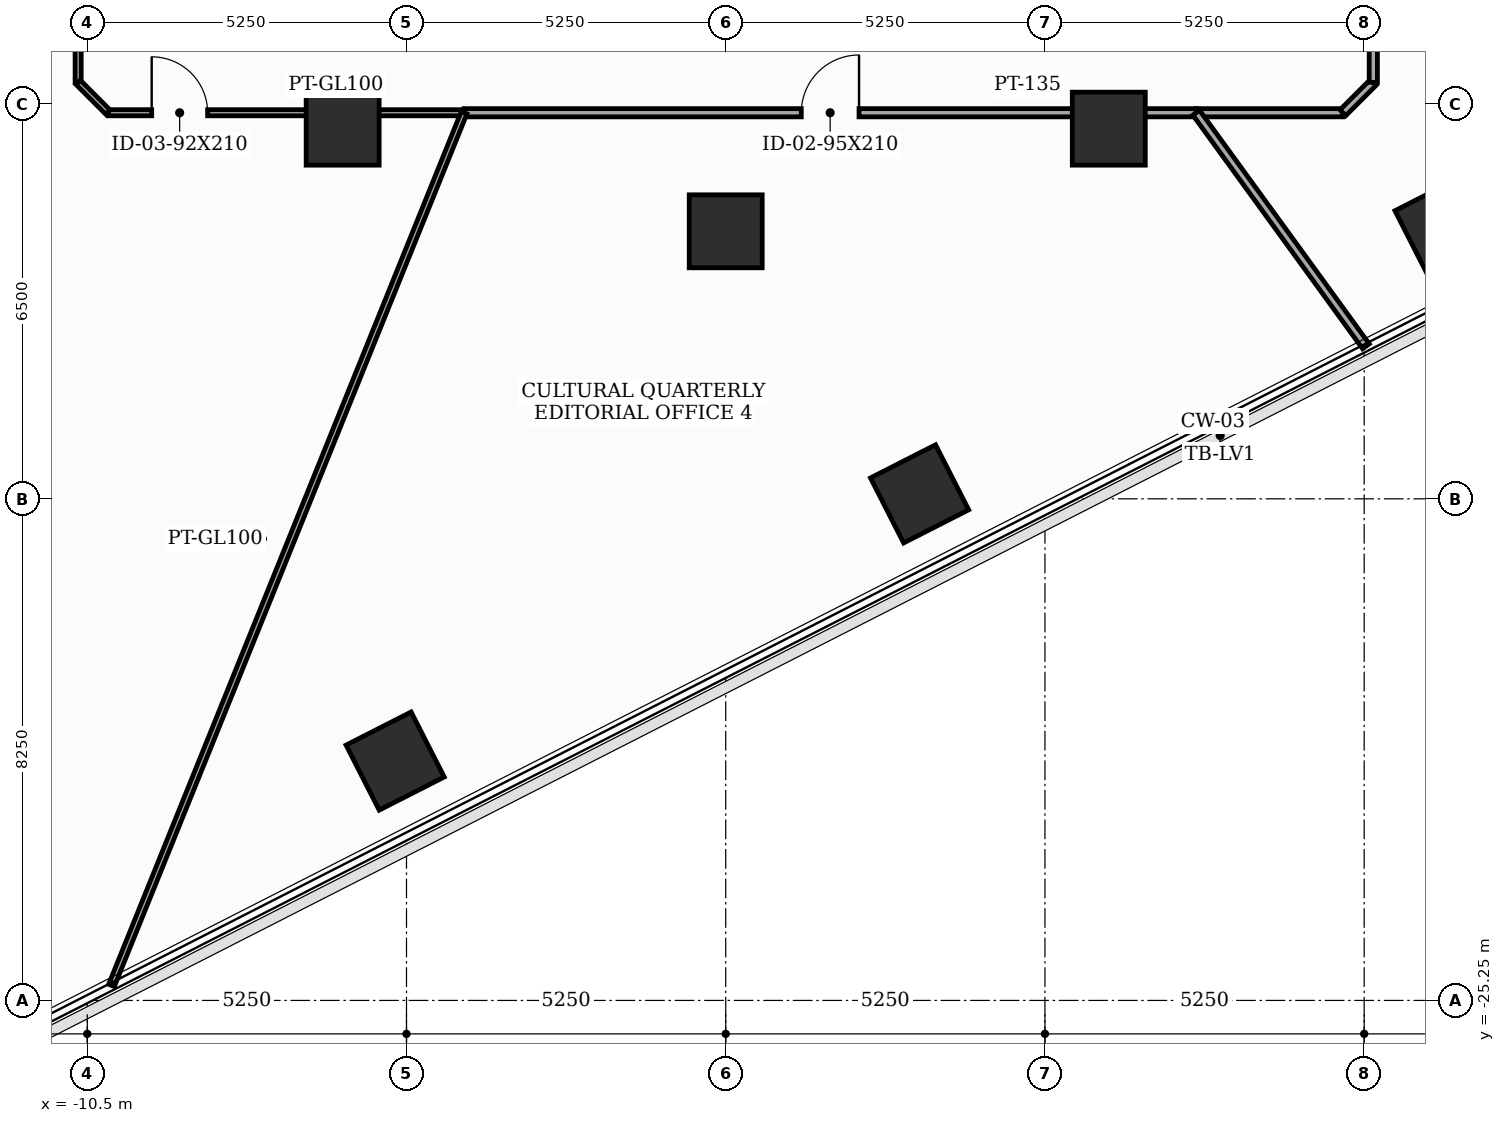
"""IFC4 building model, lengths in metres.
Left out: names, types, materials, properties, quantities, classifications, styles, units other than length and angle.
Written with IfcOpenShell. Run it as: python <this file> out.ifc"""

import sys

from ifc_helpers import new_model, si_unit, direction, frame, frame_2d, origin, origin_2d, place, context, subcontext, project, spatial, rectangle, extrude, element, fill, save


model = new_model("IFC4")
c1 = context("Model", 3, precision=1e-05, world=origin(), true_north=direction((0.0, 1.0)))
c2 = subcontext(c1, "Body", "Model", "MODEL_VIEW")
j1 = project(units=[si_unit("LENGTHUNIT", "METRE"), si_unit("PLANEANGLEUNIT", "RADIAN")], contexts=[c1])
p1 = place(None, origin())
s1 = spatial("IfcSite", under=j1, at=p1, CompositionType="ELEMENT")
p2 = place(p1, origin())
s2 = spatial("IfcBuilding", under=s1, at=p2, CompositionType="ELEMENT")
p3 = place(p2, frame((0.0, 0.0, 138.4)))
s3 = spatial("IfcBuildingStorey", under=s2, at=p3, CompositionType="ELEMENT", Elevation=138.4)
for number, where, z_axis, x_axis in (
    (1, (-6.3, -10.912, 0.0), (0.0, 0.0, 1.0), (1.0, 0.0, 0.0)),
    (2, (0.0, -12.6, 0.0), (0.0, 0.0, 1.0), (1.0, 0.0, 0.0)),
    (3, (6.3, -10.912, 0.0), (0.0, 0.0, 1.0), (1.0, 0.0, 0.0)),
    (4, (-5.437, -21.313, 0.0), (0.0, 0.0, 1.0), (0.891, 0.454, 0.0)),
    (5, (3.188, -16.918, 0.0), (0.0, 0.0, 1.0), (0.891, 0.454, 0.0)),
    (6, (11.813, -12.524, 0.0), (0.0, 0.0, 1.0), (0.891, 0.454, 0.0)),
):
    element("IfcColumn", number, at=place(p3, frame(where, z_axis=z_axis, x_axis=x_axis)), inside=s3, PredefinedType="COLUMN", context=c2, shape_type="SweptSolid", body=[
        extrude(rectangle(XDim=1.2, YDim=1.2, at=origin_2d()), origin(), (0.0, 0.0, 1.0), 3.7),
    ])
p4 = place(p3, frame((-10.65, -6.655, 0.0), z_axis=(0.0, 0.0, 1.0), x_axis=(0.0, -1.0, 0.0)))
e7 = element("IfcWall", 7, at=p4, inside=s3, PredefinedType="MOVABLE", context=c2, shape_type="SweptSolid", body=[
    extrude(rectangle(XDim=3.495, YDim=0.1, at=frame_2d((1.748, 0.0))), origin(), (0.0, 0.0, 1.0), 2.785),
])
p5 = place(p3, frame((-10.65, -10.15, 0.0), z_axis=(0.0, 0.0, 1.0), x_axis=(0.707106781187, -0.707106781187, 0.0)))
e8 = element("IfcWall", 8, at=p5, inside=s3, PredefinedType="MOVABLE", context=c2, shape_type="SweptSolid", body=[
    extrude(rectangle(XDim=0.707, YDim=0.1, at=frame_2d((0.354, 0.0))), origin(), (0.0, 0.0, 1.0), 3.5),
])
p6 = place(p3, frame((-10.15, -10.65, 0.0), z_axis=(0.0, 0.0, 1.0), x_axis=(1.0, 0.0, 0.0)))
e9 = element("IfcWall", 9, at=p6, inside=s3, PredefinedType="MOVABLE", context=c2, shape_type="SweptSolid", body=[
    extrude(rectangle(XDim=5.847, YDim=0.1, at=frame_2d((2.923, 0.0))), origin(), (0.0, 0.0, 1.0), 2.785),
])
p7 = place(p6, frame((0.709, 0.0, 0.0)))
e10 = element("IfcOpeningElement", 10, at=p7, cuts=e9, PredefinedType="OPENING", context=c2, shape_type="SweptSolid", body=[
    extrude(rectangle(XDim=0.92, YDim=2.1, at=frame_2d((0.46, 1.05))), frame((0.0, 0.06, 0.0), z_axis=(0.0, -1.0, 0.0), x_axis=(1.0, 0.0, 0.0)), (0.0, 0.0, 1.0), 0.12),
])
p8 = place(p3, frame((-4.303, -10.65, 0.0), z_axis=(0.0, 0.0, 1.0), x_axis=(1.0, 0.0, 0.0)))
e11 = element("IfcWall", 11, at=p8, inside=s3, PredefinedType="PARTITIONING", context=c2, shape_type="SweptSolid", body=[
    extrude(rectangle(XDim=12.041, YDim=0.135, at=frame_2d((6.021, 0.0))), origin(), (0.0, 0.0, 1.0), 2.785),
])
p9 = place(p8, frame((5.545, 0.0, 0.0)))
e12 = element("IfcOpeningElement", 12, at=p9, cuts=e11, PredefinedType="OPENING", context=c2, shape_type="SweptSolid", body=[
    extrude(rectangle(XDim=0.95, YDim=2.1, at=frame_2d((0.475, 1.05))), frame((0.0, 0.077, 0.0), z_axis=(0.0, -1.0, 0.0), x_axis=(1.0, 0.0, 0.0)), (0.0, 0.0, 1.0), 0.155),
])
p10 = place(p3, frame((7.738, -10.65, 0.0), z_axis=(0.0, 0.0, 1.0), x_axis=(1.0, 0.0, 0.0)))
e13 = element("IfcWall", 13, at=p10, inside=s3, PredefinedType="PARTITIONING", context=c2, shape_type="SweptSolid", body=[
    extrude(rectangle(XDim=2.412, YDim=0.135, at=frame_2d((1.206, 0.0))), origin(), (0.0, 0.0, 1.0), 3.5),
])
p11 = place(p3, frame((10.15, -10.65, 0.0), z_axis=(0.0, 0.0, 1.0), x_axis=(0.707106781187, 0.707106781187, 0.0)))
e14 = element("IfcWall", 14, at=p11, inside=s3, PredefinedType="PARTITIONING", context=c2, shape_type="SweptSolid", body=[
    extrude(rectangle(XDim=0.707, YDim=0.135, at=frame_2d((0.354, 0.0))), origin(), (0.0, 0.0, 1.0), 3.5),
])
p12 = place(p3, frame((10.65, -10.15, 0.0), z_axis=(0.0, 0.0, 1.0), x_axis=(0.0, 1.0, 0.0)))
e15 = element("IfcWall", 15, at=p12, inside=s3, PredefinedType="PARTITIONING", context=c2, shape_type="SweptSolid", body=[
    extrude(rectangle(XDim=15.813, YDim=0.135, at=frame_2d((7.906, 0.0))), origin(), (0.0, 0.0, 1.0), 2.785),
])
p13 = place(p12, frame((7.431, 0.0, 0.0)))
e16 = element("IfcOpeningElement", 16, at=p13, cuts=e15, PredefinedType="OPENING", context=c2, shape_type="SweptSolid", body=[
    extrude(rectangle(XDim=0.95, YDim=2.1, at=frame_2d((0.475, 1.05))), frame((0.0, 0.077, 0.0), z_axis=(0.0, -1.0, 0.0), x_axis=(1.0, 0.0, 0.0)), (0.0, 0.0, 1.0), 0.155),
])
p14 = place(p3, frame((-10.102, -25.003, 0.0), z_axis=(0.0, 0.0, 1.0), x_axis=(0.374591600556, 0.927189911935, 0.0)))
e17 = element("IfcWall", 17, at=p14, inside=s3, PredefinedType="MOVABLE", context=c2, shape_type="SweptSolid", body=[
    extrude(rectangle(XDim=15.48, YDim=0.1, at=frame_2d((7.74, 0.0))), origin(), (0.0, 0.0, 1.0), 2.785),
])
p15 = place(p3, frame((10.529, -14.491, 0.0), z_axis=(0.0, 0.0, 1.0), x_axis=(-0.58771300603, 0.809069479429, 0.0)))
e18 = element("IfcWall", 18, at=p15, inside=s3, PredefinedType="PARTITIONING", context=c2, shape_type="SweptSolid", body=[
    extrude(rectangle(XDim=4.748, YDim=0.135, at=frame_2d((2.374, 0.0))), origin(), (0.0, 0.0, 1.0), 2.885),
])
p16 = place(p7, origin())
e19 = element("IfcDoor", 19, at=p16, inside=s3, OperationType="SINGLE_SWING_LEFT", PredefinedType="DOOR", context=c2, shape_type="SweptSolid", body=[
    extrude(rectangle(XDim=0.92, YDim=2.1, at=frame_2d((0.46, 1.05))), frame((0.0, 0.025, 0.0), z_axis=(0.0, -1.0, 0.0), x_axis=(1.0, 0.0, 0.0)), (0.0, 0.0, 1.0), 0.05),
])
fill(e10, e19)
p17 = place(p9, origin())
e20 = element("IfcDoor", 20, at=p17, inside=s3, OperationType="SINGLE_SWING_RIGHT", PredefinedType="DOOR", context=c2, shape_type="SweptSolid", body=[
    extrude(rectangle(XDim=0.95, YDim=2.1, at=frame_2d((0.475, 1.05))), frame((0.0, 0.025, 0.0), z_axis=(0.0, -1.0, 0.0), x_axis=(1.0, 0.0, 0.0)), (0.0, 0.0, 1.0), 0.05),
])
fill(e12, e20)
save(model, sys.argv[1])
